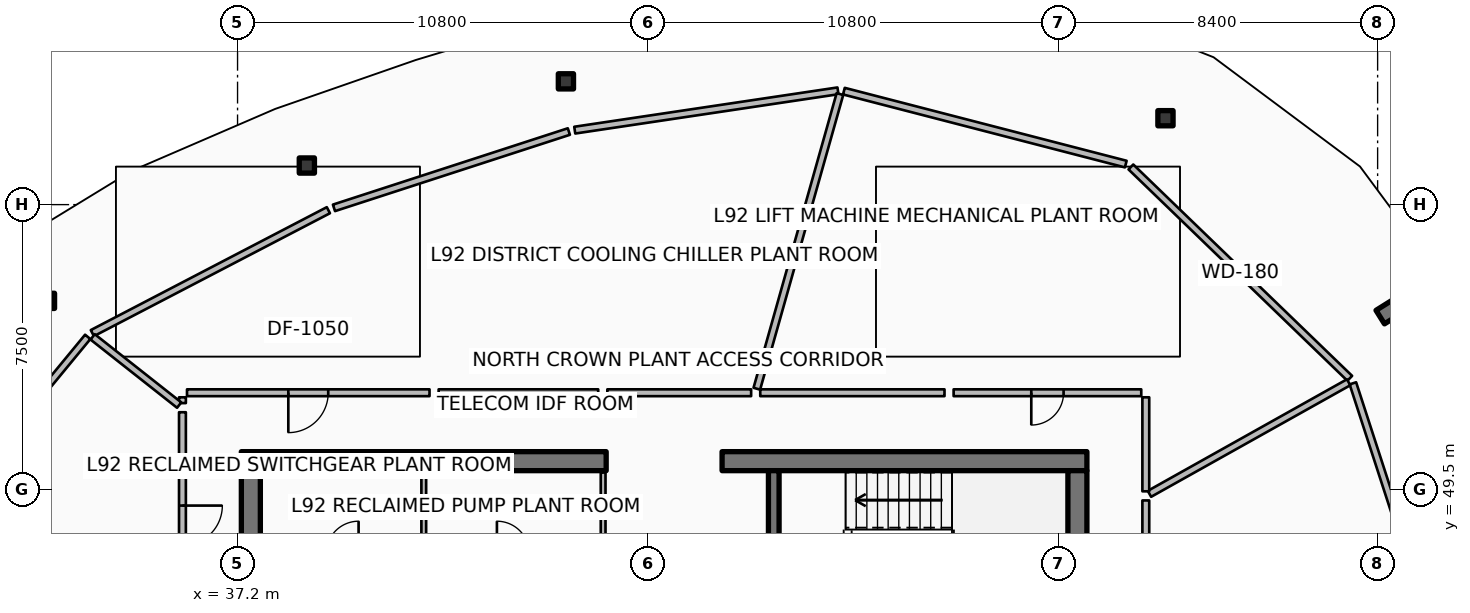
"""IFC4 building model, lengths in metres.
Left out: names, types, materials, properties, quantities, classifications, styles, units other than length and angle.
Written with IfcOpenShell. Run it as: python <this file> out.ifc"""

import sys

from ifc_helpers import new_model, si_unit, direction, frame, frame_2d, origin, origin_2d, place, context, subcontext, project, spatial, rectangle, hollow_rectangle, extrude, element, fill, save


model = new_model("IFC4")
c1 = context("Model", 3, precision=1e-05, world=origin(), true_north=direction((0.0, 1.0)))
c2 = subcontext(c1, "Body", "Model", "MODEL_VIEW")
j1 = project(units=[si_unit("LENGTHUNIT", "METRE"), si_unit("PLANEANGLEUNIT", "RADIAN")], contexts=[c1])
p1 = place(None, origin())
s1 = spatial("IfcSite", under=j1, at=p1, CompositionType="ELEMENT")
p2 = place(p1, origin())
s2 = spatial("IfcBuilding", under=s1, at=p2, CompositionType="ELEMENT")
p3 = place(p2, frame((0.0, 0.0, 366.8)))
s3 = spatial("IfcBuildingStorey", under=s2, at=p3, CompositionType="ELEMENT", Elevation=366.8)
p4 = place(p3, frame((37.3, 50.25, 0.0), z_axis=(0.0, 0.0, 1.0), x_axis=(1.0, 0.0, 0.0)))
e1 = element("IfcWall", 1, at=p4, inside=s3, PredefinedType="SHEAR", context=c2, shape_type="SweptSolid", body=[
    extrude(rectangle(XDim=9.6, YDim=0.5, at=frame_2d((4.8, 0.0))), origin(), (0.0, 0.0, 1.0), 3.6),
])
p5 = place(p3, frame((49.95, 50.25, 0.0), z_axis=(0.0, 0.0, 1.0), x_axis=(1.0, 0.0, 0.0)))
e2 = element("IfcWall", 2, at=p5, inside=s3, PredefinedType="SHEAR", context=c2, shape_type="SweptSolid", body=[
    extrude(rectangle(XDim=9.6, YDim=0.5, at=frame_2d((4.8, 0.0))), origin(), (0.0, 0.0, 1.0), 3.6),
])
for number, where, z_axis, x_axis in (
    (3, (37.55, 34.0, 0.0), (0.0, 0.0, 1.0), (0.0, 1.0, 0.0)),
    (4, (59.3, 34.0, 0.0), (0.0, 0.0, 1.0), (0.0, 1.0, 0.0)),
):
    element("IfcWall", number, at=place(p3, frame(where, z_axis=z_axis, x_axis=x_axis)), inside=s3, PredefinedType="SHEAR", context=c2, shape_type="SweptSolid", body=[
        extrude(rectangle(XDim=16.0, YDim=0.5, at=frame_2d((8.0, 0.0))), origin(), (0.0, 0.0, 1.0), 3.6),
    ])
p6 = place(p3, frame((51.31, 46.5, 0.0), z_axis=(0.0, 0.0, 1.0), x_axis=(0.0, 1.0, 0.0)))
e5 = element("IfcWall", 5, at=p6, inside=s3, PredefinedType="SHEAR", context=c2, shape_type="SweptSolid", body=[
    extrude(rectangle(XDim=3.5, YDim=0.28, at=frame_2d((1.75, 0.0))), origin(), (0.0, 0.0, 1.0), 3.6),
])
p7 = place(p3, frame((67.269, 54.041, 0.0), z_axis=(0.0, 0.0, 1.0), x_axis=(0.848033572426, 0.529942506352, 0.0)))
e6 = element("IfcWall", 6, at=p7, inside=s3, PredefinedType="SOLIDWALL", context=c2, shape_type="SweptSolid", body=[
    extrude(rectangle(XDim=3.5, YDim=0.42, at=frame_2d((1.75, 0.0))), origin(), (0.0, 0.0, 1.0), 3.6),
])
for number, where, z_axis, x_axis in (
    (7, (61.617, 59.274, 0.0), (0.0, 0.0, 1.0), (1.0, 0.0, 0.0)),
    (8, (45.841, 60.244, 0.0), (0.0, 0.0, 1.0), (1.0, 0.0, 0.0)),
    (9, (39.023, 58.029, 0.0), (0.0, 0.0, 1.0), (1.0, 0.0, 0.0)),
    (10, (32.185, 54.468, 0.0), (0.0, 0.0, 1.0), (1.0, 0.0, 0.0)),
):
    element("IfcColumn", number, at=place(p3, frame(where, z_axis=z_axis, x_axis=x_axis)), inside=s3, PredefinedType="COLUMN", context=c2, shape_type="SweptSolid", body=[
        extrude(hollow_rectangle(XDim=0.4, YDim=0.4, WallThickness=0.02, InnerFilletRadius=0.02, OuterFilletRadius=0.04, at=origin_2d()), origin(), (0.0, 0.0, 1.0), 3.32),
    ])
for number, where, z_axis, x_axis in (
    (11, (46.82, 47.92, 0.0), (0.0, 0.0, 1.0), (0.0, 1.0, 0.0)),
    (12, (42.1, 47.92, 0.0), (0.0, 0.0, 1.0), (0.0, 1.0, 0.0)),
):
    element("IfcWall", number, at=place(p3, frame(where, z_axis=z_axis, x_axis=x_axis)), inside=s3, PredefinedType="PARTITIONING", context=c2, shape_type="SweptSolid", body=[
        extrude(rectangle(XDim=2.03, YDim=0.125, at=frame_2d((1.015, 0.0))), origin(), (0.0, 0.0, 1.0), 2.76),
    ])
p8 = place(p3, frame((66.467, 52.43, 0.0), z_axis=(0.0, 0.0, 1.0), x_axis=(-0.719364153135, 0.694633151516, 0.0)))
e13 = element("IfcWall", 13, at=p8, inside=s3, PredefinedType="PARTITIONING", context=c2, shape_type="SweptSolid", body=[
    extrude(rectangle(XDim=8.006, YDim=0.18, at=frame_2d((4.003, 0.0))), origin(), (0.0, 0.0, 1.0), 2.76),
])
p9 = place(p3, frame((60.573, 58.066, 0.0), z_axis=(0.0, 0.0, 1.0), x_axis=(-0.968117205342, 0.250497658115, 0.0)))
e14 = element("IfcWall", 14, at=p9, inside=s3, PredefinedType="PARTITIONING", context=c2, shape_type="SweptSolid", body=[
    extrude(rectangle(XDim=7.662, YDim=0.18, at=frame_2d((3.831, 0.0))), origin(), (0.0, 0.0, 1.0), 2.76),
])
p10 = place(p3, frame((52.999, 59.994, 0.0), z_axis=(0.0, 0.0, 1.0), x_axis=(-0.989034336252, -0.147685753256, 0.0)))
e15 = element("IfcWall", 15, at=p10, inside=s3, PredefinedType="PARTITIONING", context=c2, shape_type="SweptSolid", body=[
    extrude(rectangle(XDim=7.003, YDim=0.18, at=frame_2d((3.501, 0.0))), origin(), (0.0, 0.0, 1.0), 2.76),
])
p11 = place(p3, frame((45.918, 58.923, 0.0), z_axis=(0.0, 0.0, 1.0), x_axis=(-0.95105283999, -0.309028308649, 0.0)))
e16 = element("IfcWall", 16, at=p11, inside=s3, PredefinedType="PARTITIONING", context=c2, shape_type="SweptSolid", body=[
    extrude(rectangle(XDim=6.499, YDim=0.18, at=frame_2d((3.25, 0.0))), origin(), (0.0, 0.0, 1.0), 2.76),
])
p12 = place(p3, frame((39.59, 56.853, 0.0), z_axis=(0.0, 0.0, 1.0), x_axis=(-0.886949494865, -0.461866423935, 0.0)))
e17 = element("IfcWall", 17, at=p12, inside=s3, PredefinedType="PARTITIONING", context=c2, shape_type="SweptSolid", body=[
    extrude(rectangle(XDim=7.002, YDim=0.18, at=frame_2d((3.501, 0.0))), origin(), (0.0, 0.0, 1.0), 2.76),
])
p13 = place(p3, frame((33.258, 53.52, 0.0), z_axis=(0.0, 0.0, 1.0), x_axis=(-0.636018833443, -0.771673534278, 0.0)))
e18 = element("IfcWall", 18, at=p13, inside=s3, PredefinedType="PARTITIONING", context=c2, shape_type="SweptSolid", body=[
    extrude(rectangle(XDim=7.661, YDim=0.18, at=frame_2d((3.831, 0.0))), origin(), (0.0, 0.0, 1.0), 2.76),
])
p14 = place(p3, frame((69.059, 44.572, 0.0), z_axis=(0.0, 0.0, 1.0), x_axis=(-0.309024234991, 0.951054163646, 0.0)))
e19 = element("IfcWall", 19, at=p14, inside=s3, PredefinedType="PARTITIONING", context=c2, shape_type="SweptSolid", body=[
    extrude(rectangle(XDim=8.124, YDim=0.18, at=frame_2d((4.062, 0.0))), origin(), (0.0, 0.0, 1.0), 2.76),
])
p15 = place(p3, frame((50.714, 52.05, 0.0), z_axis=(0.0, 0.0, 1.0), x_axis=(-1.0, 0.0, 0.0)))
e20 = element("IfcWall", 20, at=p15, inside=s3, PredefinedType="PARTITIONING", context=c2, shape_type="SweptSolid", body=[
    extrude(rectangle(XDim=3.784, YDim=0.18, at=frame_2d((1.892, 0.0))), origin(), (0.0, 0.0, 1.0), 2.76),
])
p16 = place(p3, frame((46.69, 52.05, 0.0), z_axis=(0.0, 0.0, 1.0), x_axis=(-1.0, 0.0, 0.0)))
e21 = element("IfcWall", 21, at=p16, inside=s3, PredefinedType="PARTITIONING", context=c2, shape_type="SweptSolid", body=[
    extrude(rectangle(XDim=4.199, YDim=0.18, at=frame_2d((2.099, 0.0))), origin(), (0.0, 0.0, 1.0), 2.76),
])
p17 = place(p3, frame((42.252, 52.05, 0.0), z_axis=(0.0, 0.0, 1.0), x_axis=(-1.0, 0.0, 0.0)))
e22 = element("IfcWall", 22, at=p17, inside=s3, PredefinedType="PARTITIONING", context=c2, shape_type="SweptSolid", body=[
    extrude(rectangle(XDim=6.382, YDim=0.18, at=frame_2d((3.191, 0.0))), origin(), (0.0, 0.0, 1.0), 2.76),
])
p18 = place(p17, frame((2.666, 0.0, 0.0)))
e23 = element("IfcOpeningElement", 23, at=p18, cuts=e22, PredefinedType="OPENING", context=c2, shape_type="SweptSolid", body=[
    extrude(rectangle(XDim=1.05, YDim=2.1, at=frame_2d((0.525, 1.05))), frame((0.0, 0.1, 0.0), z_axis=(0.0, -1.0, 0.0), x_axis=(1.0, 0.0, 0.0)), (0.0, 0.0, 1.0), 0.2),
])
p19 = place(p3, frame((35.75, 51.93, 0.0), z_axis=(0.0, 0.0, 1.0), x_axis=(0.0, -1.0, 0.0)))
e24 = element("IfcWall", 24, at=p19, inside=s3, PredefinedType="PARTITIONING", context=c2, shape_type="SweptSolid", body=[
    extrude(rectangle(XDim=0.153, YDim=0.18, at=frame_2d((0.076, 0.0))), origin(), (0.0, 0.0, 1.0), 2.76),
])
p20 = place(p3, frame((50.864, 52.156, 0.0), z_axis=(0.0, 0.0, 1.0), x_axis=(0.271457285698, 0.962450488099, 0.0)))
e25 = element("IfcWall", 25, at=p20, inside=s3, PredefinedType="PARTITIONING", context=c2, shape_type="SweptSolid", body=[
    extrude(rectangle(XDim=8.056, YDim=0.18, at=frame_2d((4.028, 0.0))), origin(), (0.0, 0.0, 1.0), 2.76),
])
p21 = place(p3, frame((35.664, 51.725, 0.0), z_axis=(0.0, 0.0, 1.0), x_axis=(-0.78528570066, 0.619133562601, 0.0)))
e26 = element("IfcWall", 26, at=p21, inside=s3, PredefinedType="PARTITIONING", context=c2, shape_type="SweptSolid", body=[
    extrude(rectangle(XDim=2.899, YDim=0.18, at=frame_2d((1.45, 0.0))), origin(), (0.0, 0.0, 1.0), 2.76),
])
p22 = place(p3, frame((35.75, 51.537, 0.0), z_axis=(0.0, 0.0, 1.0), x_axis=(0.0, -1.0, 0.0)))
e27 = element("IfcWall", 27, at=p22, inside=s3, PredefinedType="PARTITIONING", context=c2, shape_type="SweptSolid", body=[
    extrude(rectangle(XDim=5.962, YDim=0.18, at=frame_2d((2.981, 0.0))), origin(), (0.0, 0.0, 1.0), 2.76),
])
p23 = place(p22, frame((2.456, 0.0, 0.0)))
e28 = element("IfcOpeningElement", 28, at=p23, cuts=e27, PredefinedType="OPENING", context=c2, shape_type="SweptSolid", body=[
    extrude(rectangle(XDim=1.05, YDim=2.1, at=frame_2d((0.525, 1.05))), frame((0.0, 0.1, 0.0), z_axis=(0.0, -1.0, 0.0), x_axis=(1.0, 0.0, 0.0)), (0.0, 0.0, 1.0), 0.2),
])
p24 = place(p3, frame((61.1, 43.67, 0.0), z_axis=(0.0, 0.0, 1.0), x_axis=(0.0, 1.0, 0.0)))
e29 = element("IfcWall", 29, at=p24, inside=s3, PredefinedType="PARTITIONING", context=c2, shape_type="SweptSolid", body=[
    extrude(rectangle(XDim=5.546, YDim=0.18, at=frame_2d((2.773, 0.0))), origin(), (0.0, 0.0, 1.0), 2.76),
])
p25 = place(p24, frame((2.348, 0.0, 0.0)))
e30 = element("IfcOpeningElement", 30, at=p25, cuts=e29, PredefinedType="OPENING", context=c2, shape_type="SweptSolid", body=[
    extrude(rectangle(XDim=0.85, YDim=2.06, at=frame_2d((0.425, 1.03))), frame((0.0, 0.1, 0.0), z_axis=(0.0, -1.0, 0.0), x_axis=(1.0, 0.0, 0.0)), (0.0, 0.0, 1.0), 0.2),
])
p26 = place(p3, frame((61.196, 49.39, 0.0), z_axis=(0.0, 0.0, 1.0), x_axis=(0.87249769897, 0.488618220385, 0.0)))
e31 = element("IfcWall", 31, at=p26, inside=s3, PredefinedType="PARTITIONING", context=c2, shape_type="SweptSolid", body=[
    extrude(rectangle(XDim=6.007, YDim=0.18, at=frame_2d((3.003, 0.0))), origin(), (0.0, 0.0, 1.0), 2.76),
])
p27 = place(p3, frame((61.1, 49.456, 0.0), z_axis=(0.0, 0.0, 1.0), x_axis=(0.0, 1.0, 0.0)))
e32 = element("IfcWall", 32, at=p27, inside=s3, PredefinedType="PARTITIONING", context=c2, shape_type="SweptSolid", body=[
    extrude(rectangle(XDim=2.474, YDim=0.18, at=frame_2d((1.237, 0.0))), origin(), (0.0, 0.0, 1.0), 2.76),
])
p28 = place(p3, frame((60.98, 52.05, 0.0), z_axis=(0.0, 0.0, 1.0), x_axis=(-1.0, 0.0, 0.0)))
e33 = element("IfcWall", 33, at=p28, inside=s3, PredefinedType="PARTITIONING", context=c2, shape_type="SweptSolid", body=[
    extrude(rectangle(XDim=4.937, YDim=0.18, at=frame_2d((2.469, 0.0))), origin(), (0.0, 0.0, 1.0), 2.76),
])
p29 = place(p28, frame((2.044, 0.0, 0.0)))
e34 = element("IfcOpeningElement", 34, at=p29, cuts=e33, PredefinedType="OPENING", context=c2, shape_type="SweptSolid", body=[
    extrude(rectangle(XDim=0.85, YDim=2.06, at=frame_2d((0.425, 1.03))), frame((0.0, 0.1, 0.0), z_axis=(0.0, -1.0, 0.0), x_axis=(1.0, 0.0, 0.0)), (0.0, 0.0, 1.0), 0.2),
])
p30 = place(p3, frame((55.803, 52.05, 0.0), z_axis=(0.0, 0.0, 1.0), x_axis=(-1.0, 0.0, 0.0)))
e35 = element("IfcWall", 35, at=p30, inside=s3, PredefinedType="PARTITIONING", context=c2, shape_type="SweptSolid", body=[
    extrude(rectangle(XDim=4.848, YDim=0.18, at=frame_2d((2.424, 0.0))), origin(), (0.0, 0.0, 1.0), 2.76),
])
p31 = place(p18, origin())
e36 = element("IfcDoor", 36, at=p31, inside=s3, OperationType="SINGLE_SWING_RIGHT", PredefinedType="DOOR", context=c2, shape_type="SweptSolid", body=[
    extrude(rectangle(XDim=1.05, YDim=2.1, at=frame_2d((0.525, 1.05))), frame((0.0, 0.025, 0.0), z_axis=(0.0, -1.0, 0.0), x_axis=(1.0, 0.0, 0.0)), (0.0, 0.0, 1.0), 0.05),
])
fill(e23, e36)
p32 = place(p23, origin())
e37 = element("IfcDoor", 37, at=p32, inside=s3, OperationType="SINGLE_SWING_LEFT", PredefinedType="DOOR", context=c2, shape_type="SweptSolid", body=[
    extrude(rectangle(XDim=1.05, YDim=2.1, at=frame_2d((0.525, 1.05))), frame((0.0, 0.025, 0.0), z_axis=(0.0, -1.0, 0.0), x_axis=(1.0, 0.0, 0.0)), (0.0, 0.0, 1.0), 0.05),
])
fill(e28, e37)
p33 = place(p29, origin())
e38 = element("IfcDoor", 38, at=p33, inside=s3, OperationType="SINGLE_SWING_RIGHT", PredefinedType="DOOR", context=c2, shape_type="SweptSolid", body=[
    extrude(rectangle(XDim=0.85, YDim=2.06, at=frame_2d((0.425, 1.03))), frame((0.0, 0.025, 0.0), z_axis=(0.0, -1.0, 0.0), x_axis=(1.0, 0.0, 0.0)), (0.0, 0.0, 1.0), 0.05),
])
fill(e34, e38)
save(model, sys.argv[1])
